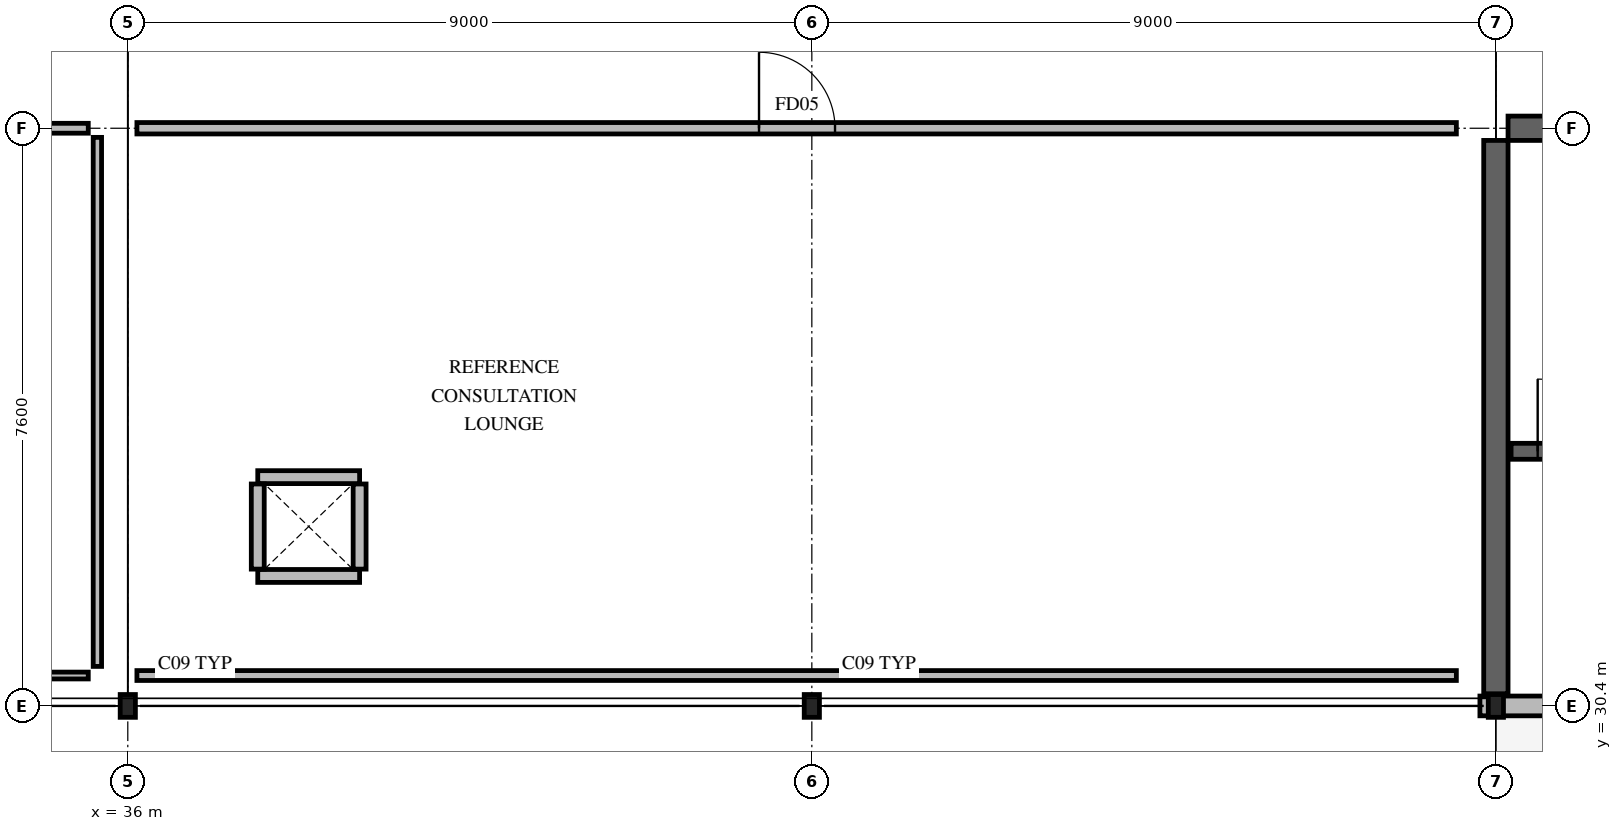
"""IFC4 building model, lengths in metres.
Left out: names, types, materials, properties, quantities, classifications, styles, units other than length and angle.
Written with IfcOpenShell. Run it as: python <this file> out.ifc"""

import sys

from ifc_helpers import new_model, si_unit, direction, frame, frame_2d, origin, origin_2d, place, context, subcontext, project, spatial, rectangle, hollow_rectangle, extrude, element, fill, save


model = new_model("IFC4")
c1 = context("Model", 3, precision=1e-05, world=origin(), true_north=direction((0.0, 1.0)))
c2 = subcontext(c1, "Body", "Model", "MODEL_VIEW")
j1 = project(units=[si_unit("LENGTHUNIT", "METRE"), si_unit("PLANEANGLEUNIT", "RADIAN")], contexts=[c1])
p1 = place(None, origin())
s1 = spatial("IfcSite", under=j1, at=p1, CompositionType="ELEMENT")
p2 = place(p1, origin())
s2 = spatial("IfcBuilding", under=s1, at=p2, CompositionType="ELEMENT")
p3 = place(p2, frame((0.0, 0.0, 9.36)))
s3 = spatial("IfcBuildingStorey", under=s2, at=p3, CompositionType="ELEMENT", Elevation=9.36)
p4 = place(p3, frame((36.0, 30.4, 0.0), z_axis=(0.0, 0.0, 1.0), x_axis=(1.0, 0.0, 0.0)))
e1 = element("IfcColumn", 1, at=p4, inside=s3, PredefinedType="COLUMN", context=c2, shape_type="SweptSolid", body=[
    extrude(hollow_rectangle(XDim=0.2, YDim=0.3, WallThickness=0.012, at=origin_2d()), origin(), (0.0, 0.0, 1.0), 8.99),
])
p5 = place(p3, frame((45.0, 30.4, 0.0), z_axis=(0.0, 0.0, 1.0), x_axis=(1.0, 0.0, 0.0)))
e2 = element("IfcColumn", 2, at=p5, inside=s3, PredefinedType="COLUMN", context=c2, shape_type="SweptSolid", body=[
    extrude(hollow_rectangle(XDim=0.2, YDim=0.3, WallThickness=0.012, at=origin_2d()), origin(), (0.0, 0.0, 1.0), 7.94),
])
p6 = place(p3, frame((54.0, 30.4, 0.0), z_axis=(0.0, 0.0, 1.0), x_axis=(1.0, 0.0, 0.0)))
e3 = element("IfcColumn", 3, at=p6, inside=s3, PredefinedType="COLUMN", context=c2, shape_type="SweptSolid", body=[
    extrude(hollow_rectangle(XDim=0.2, YDim=0.3, WallThickness=0.012, at=origin_2d()), origin(), (0.0, 0.0, 1.0), 7.19),
])
p7 = place(p3, frame((53.79, 30.4, 0.0), z_axis=(0.0, 0.0, 1.0), x_axis=(1.0, 0.0, 0.0)))
e4 = element("IfcWall", 4, at=p7, inside=s3, PredefinedType="STANDARD", context=c2, shape_type="SweptSolid", body=[
    extrude(rectangle(XDim=9.21, YDim=0.26, at=frame_2d((4.605, 0.0))), origin(), (0.0, 0.0, 1.0), 4.04),
])
p8 = place(p7, frame((3.8, 0.0, 0.0)))
e5 = element("IfcOpeningElement", 5, at=p8, cuts=e4, PredefinedType="OPENING", context=c2, shape_type="SweptSolid", body=[
    extrude(rectangle(XDim=1.82, YDim=2.2, at=frame_2d((0.91, 1.1))), frame((0.0, 0.14, 0.0), z_axis=(0.0, -1.0, 0.0), x_axis=(1.0, 0.0, 0.0)), (0.0, 0.0, 1.0), 0.28),
])
p9 = place(p3, frame((54.16, 38.0, 0.0), z_axis=(0.0, 0.0, 1.0), x_axis=(1.0, 0.0, 0.0)))
e6 = element("IfcWall", 6, at=p9, inside=s3, PredefinedType="SHEAR", context=c2, shape_type="SweptSolid", body=[
    extrude(rectangle(XDim=8.68, YDim=0.32, at=frame_2d((4.34, 0.0))), origin(), (0.0, 0.0, 1.0), 4.04),
])
p10 = place(p3, frame((54.0, 30.56, 0.0), z_axis=(0.0, 0.0, 1.0), x_axis=(0.0, 1.0, 0.0)))
e7 = element("IfcWall", 7, at=p10, inside=s3, PredefinedType="SHEAR", context=c2, shape_type="SweptSolid", body=[
    extrude(rectangle(XDim=7.28, YDim=0.32, at=frame_2d((3.64, 0.0))), origin(), (0.0, 0.0, 1.0), 4.04),
])
p11 = place(p3, frame((54.2, 33.75, 0.0), z_axis=(0.0, 0.0, 1.0), x_axis=(1.0, 0.0, 0.0)))
e8 = element("IfcWall", 8, at=p11, inside=s3, PredefinedType="SOLIDWALL", context=c2, shape_type="SweptSolid", body=[
    extrude(rectangle(XDim=7.0, YDim=0.21, at=frame_2d((3.5, 0.0))), origin(), (0.0, 0.0, 1.0), 4.04),
])
p12 = place(p11, frame((0.35, 0.0, 0.0)))
e9 = element("IfcOpeningElement", 9, at=p12, cuts=e8, PredefinedType="OPENING", context=c2, shape_type="SweptSolid", body=[
    extrude(rectangle(XDim=0.95, YDim=2.12, at=frame_2d((0.475, 1.06))), frame((0.0, 0.115, 0.0), z_axis=(0.0, -1.0, 0.0), x_axis=(1.0, 0.0, 0.0)), (0.0, 0.0, 1.0), 0.23),
])
p13 = place(p3, frame((37.71, 32.11, 0.0), z_axis=(0.0, 0.0, 1.0), x_axis=(1.0, 0.0, 0.0)))
e10 = element("IfcWall", 10, at=p13, inside=s3, PredefinedType="PARTITIONING", context=c2, shape_type="SweptSolid", body=[
    extrude(rectangle(XDim=1.34, YDim=0.17, at=frame_2d((0.67, 0.0))), origin(), (0.0, 0.0, 1.0), 4.04),
])
p14 = place(p3, frame((39.05, 32.2, 0.0), z_axis=(0.0, 0.0, 1.0), x_axis=(0.0, 1.0, 0.0)))
e11 = element("IfcWall", 11, at=p14, inside=s3, PredefinedType="PARTITIONING", context=c2, shape_type="SweptSolid", body=[
    extrude(rectangle(XDim=1.12, YDim=0.17, at=frame_2d((0.56, 0.0))), origin(), (0.0, 0.0, 1.0), 4.04),
])
p15 = place(p3, frame((39.05, 33.41, 0.0), z_axis=(0.0, 0.0, 1.0), x_axis=(-1.0, 0.0, 0.0)))
e12 = element("IfcWall", 12, at=p15, inside=s3, PredefinedType="PARTITIONING", context=c2, shape_type="SweptSolid", body=[
    extrude(rectangle(XDim=1.34, YDim=0.17, at=frame_2d((0.67, 0.0))), origin(), (0.0, 0.0, 1.0), 4.04),
])
p16 = place(p3, frame((37.71, 33.32, 0.0), z_axis=(0.0, 0.0, 1.0), x_axis=(0.0, -1.0, 0.0)))
e13 = element("IfcWall", 13, at=p16, inside=s3, PredefinedType="PARTITIONING", context=c2, shape_type="SweptSolid", body=[
    extrude(rectangle(XDim=1.12, YDim=0.17, at=frame_2d((0.56, 0.0))), origin(), (0.0, 0.0, 1.0), 4.04),
])
p17 = place(p3, frame((9.52, 38.0, 0.0), z_axis=(0.0, 0.0, 1.0), x_axis=(1.0, 0.0, 0.0)))
e14 = element("IfcWall", 14, at=p17, inside=s3, PredefinedType="PARTITIONING", context=c2, shape_type="SweptSolid", body=[
    extrude(rectangle(XDim=25.96, YDim=0.13, at=frame_2d((12.98, 0.0))), origin(), (0.0, 0.0, 1.0), 3.48),
])
p18 = place(p17, frame((12.51, 0.0, 0.0)))
e15 = element("IfcOpeningElement", 15, at=p18, cuts=e14, PredefinedType="OPENING", context=c2, shape_type="SweptSolid", body=[
    extrude(rectangle(XDim=0.94, YDim=2.06, at=frame_2d((0.47, 1.03))), frame((0.0, 0.075, 0.0), z_axis=(0.0, -1.0, 0.0), x_axis=(1.0, 0.0, 0.0)), (0.0, 0.0, 1.0), 0.15),
])
p19 = place(p3, frame((35.6, 30.92, 0.0), z_axis=(0.0, 0.0, 1.0), x_axis=(0.0, 1.0, 0.0)))
e16 = element("IfcWall", 16, at=p19, inside=s3, PredefinedType="PARTITIONING", context=c2, shape_type="SweptSolid", body=[
    extrude(rectangle(XDim=6.96, YDim=0.11, at=frame_2d((3.48, 0.0))), origin(), (0.0, 0.0, 1.0), 4.04),
])
p20 = place(p3, frame((9.52, 30.8, 0.0), z_axis=(0.0, 0.0, 1.0), x_axis=(1.0, 0.0, 0.0)))
e17 = element("IfcWall", 17, at=p20, inside=s3, PredefinedType="PARTITIONING", context=c2, shape_type="SweptSolid", body=[
    extrude(rectangle(XDim=25.96, YDim=0.09, at=frame_2d((12.98, 0.0))), origin(), (0.0, 0.0, 1.0), 4.04),
])
p21 = place(p3, frame((36.12, 38.0, 0.0), z_axis=(0.0, 0.0, 1.0), x_axis=(1.0, 0.0, 0.0)))
e18 = element("IfcWall", 18, at=p21, inside=s3, PredefinedType="PARTITIONING", context=c2, shape_type="SweptSolid", body=[
    extrude(rectangle(XDim=17.36, YDim=0.15, at=frame_2d((8.68, 0.0))), origin(), (0.0, 0.0, 1.0), 4.04),
])
p22 = place(p21, frame((8.185, 0.0, 0.0)))
e19 = element("IfcOpeningElement", 19, at=p22, cuts=e18, PredefinedType="OPENING", context=c2, shape_type="SweptSolid", body=[
    extrude(rectangle(XDim=1.0, YDim=2.15, at=frame_2d((0.5, 1.075))), frame((0.0, 0.085, 0.0), z_axis=(0.0, -1.0, 0.0), x_axis=(1.0, 0.0, 0.0)), (0.0, 0.0, 1.0), 0.17),
])
p23 = place(p3, frame((36.12, 30.8, 0.0), z_axis=(0.0, 0.0, 1.0), x_axis=(1.0, 0.0, 0.0)))
e20 = element("IfcWall", 20, at=p23, inside=s3, PredefinedType="PARTITIONING", context=c2, shape_type="SweptSolid", body=[
    extrude(rectangle(XDim=17.36, YDim=0.13, at=frame_2d((8.68, 0.0))), origin(), (0.0, 0.0, 1.0), 4.04),
])
p24 = place(p12, origin())
e21 = element("IfcDoor", 21, at=p24, inside=s3, OperationType="SINGLE_SWING_LEFT", PredefinedType="DOOR", context=c2, shape_type="SweptSolid", body=[
    extrude(rectangle(XDim=0.95, YDim=2.12, at=frame_2d((0.475, 1.06))), frame((0.0, 0.025, 0.0), z_axis=(0.0, -1.0, 0.0), x_axis=(1.0, 0.0, 0.0)), (0.0, 0.0, 1.0), 0.05),
])
fill(e9, e21)
p25 = place(p22, origin())
e22 = element("IfcDoor", 22, at=p25, inside=s3, OperationType="SINGLE_SWING_LEFT", PredefinedType="DOOR", context=c2, shape_type="SweptSolid", body=[
    extrude(rectangle(XDim=1.0, YDim=2.15, at=frame_2d((0.5, 1.075))), frame((0.0, 0.025, 0.0), z_axis=(0.0, -1.0, 0.0), x_axis=(1.0, 0.0, 0.0)), (0.0, 0.0, 1.0), 0.05),
])
fill(e19, e22)
save(model, sys.argv[1])
